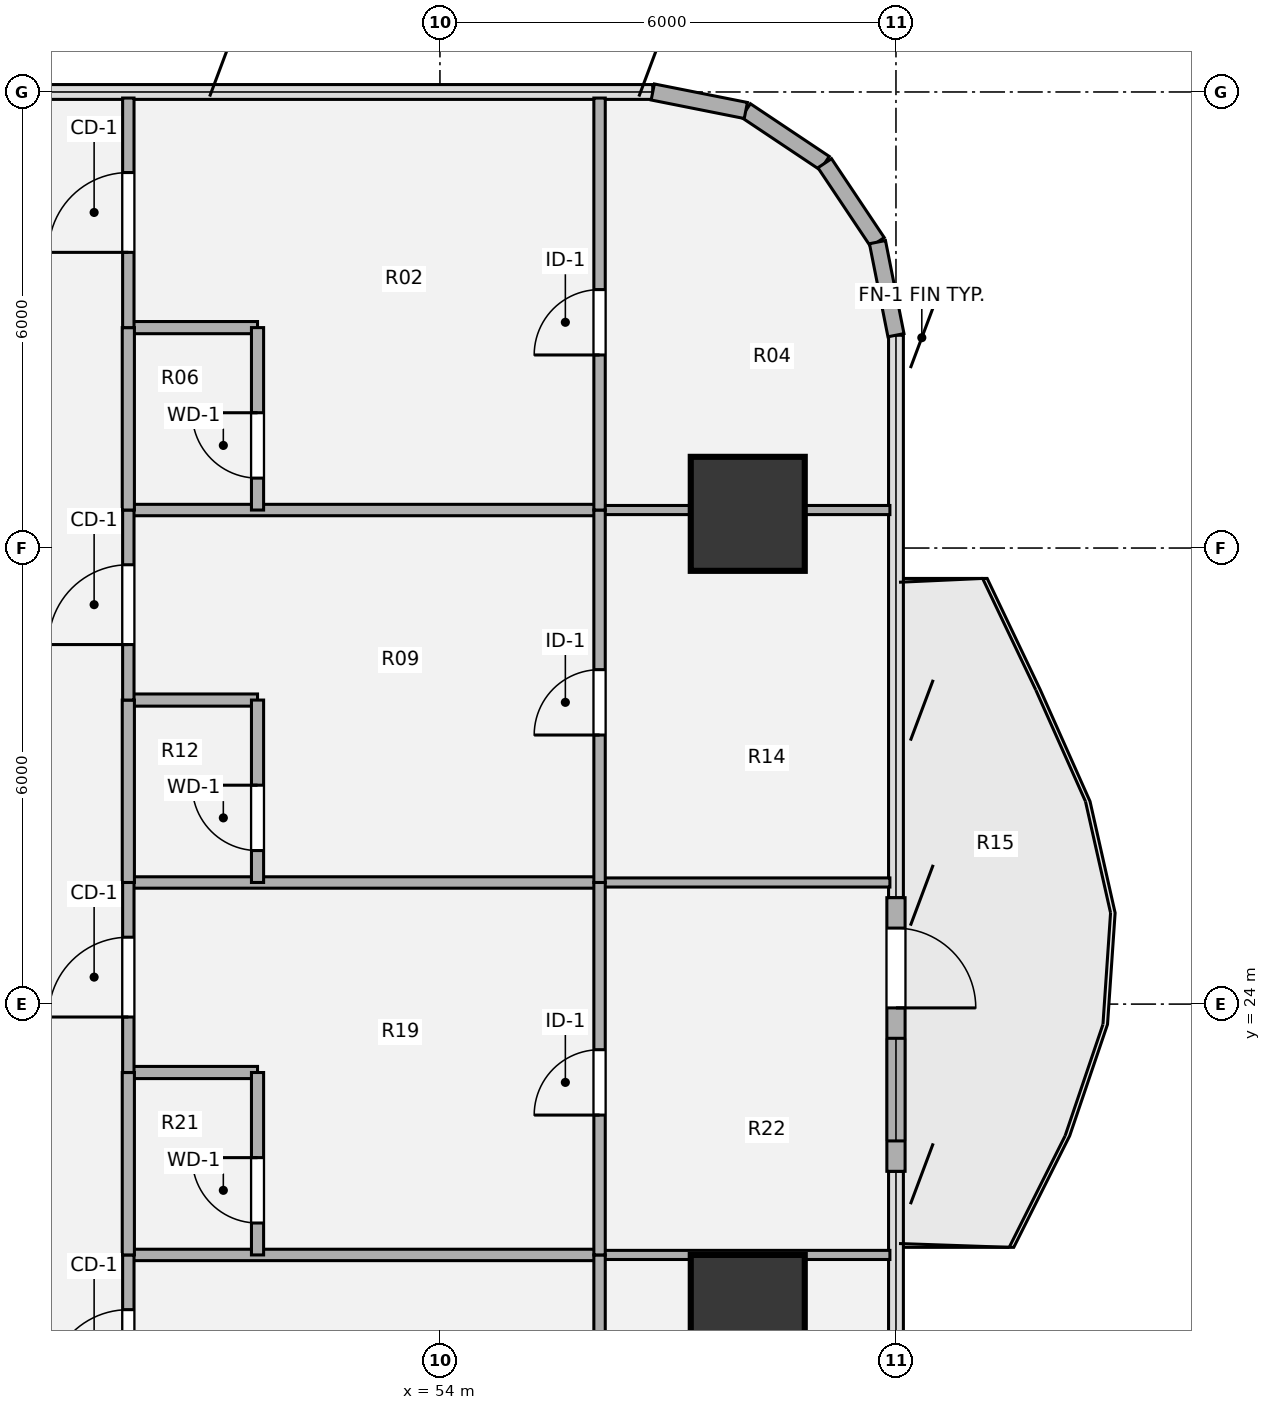
"""IFC4 building model, lengths in metres.
Left out: names, types, materials, properties, quantities, classifications, styles, units other than length and angle.
Written with IfcOpenShell. Run it as: python <this file> out.ifc"""

import sys

from ifc_helpers import new_model, si_unit, direction, frame, frame_2d, origin, origin_2d, place, context, subcontext, project, spatial, rectangle, hollow_circle, extrude, source, transform, mapped, element, fill, save


model = new_model("IFC4")
c1 = context("Model", 3, precision=1e-05, world=origin(), true_north=direction((0.0, 1.0)))
c2 = subcontext(c1, "Body", "Model", "MODEL_VIEW")
j1 = project(units=[si_unit("LENGTHUNIT", "METRE"), si_unit("PLANEANGLEUNIT", "RADIAN")], contexts=[c1])
p1 = place(None, origin())
s1 = spatial("IfcSite", under=j1, at=p1, CompositionType="ELEMENT")
p2 = place(p1, origin())
s2 = spatial("IfcBuilding", under=s1, at=p2, CompositionType="ELEMENT")
p3 = place(p2, frame((0.0, 0.0, 68.58)))
s3 = spatial("IfcBuildingStorey", under=s2, at=p3, CompositionType="ELEMENT", Elevation=68.58)
m1 = source(origin(), c2, "Body", "SweptSolid", [
    extrude(hollow_circle(Radius=0.75, WallThickness=0.05, at=origin_2d()), origin(), (0.0, 0.0, 1.0), 3.78),
])
for number, where, z_axis, x_axis in (
    (1, (58.05, 19.95, 0.0), (0.0, 0.0, 1.0), (1.0, 0.0, 0.0)),
    (2, (58.05, 30.45, 0.0), (0.0, 0.0, 1.0), (1.0, 0.0, 0.0)),
):
    element("IfcColumn", number, at=place(p3, frame(where, z_axis=z_axis, x_axis=x_axis)), inside=s3, PredefinedType="COLUMN", context=c2, shape_type="MappedRepresentation", body=[
        mapped(m1, transform((0.0, 0.0, 0.0), x_axis=(1.0, 0.0, 0.0), y_axis=(0.0, 1.0, 0.0), z_axis=(0.0, 0.0, 1.0), scale=1.0)),
    ])
for number, where, z_axis, x_axis in (
    (3, (58.025, 35.756, 0.0), (0.0, 0.0, 1.0), (0.831, -0.556, 0.0)),
    (4, (59.063, 35.063, 0.0), (0.0, 0.0, 1.0), (0.556, -0.831, 0.0)),
    (5, (59.756, 34.025, 0.0), (0.0, 0.0, 1.0), (0.195, -0.981, 0.0)),
):
    element("IfcWall", number, at=place(p3, frame(where, z_axis=z_axis, x_axis=x_axis)), inside=s3, PredefinedType="SOLIDWALL", context=c2, shape_type="SweptSolid", body=[
        extrude(rectangle(XDim=1.249, YDim=0.215, at=frame_2d((0.624, 0.0))), origin(), (0.0, 0.0, 1.0), 3.53),
    ])
p4 = place(p3, frame((60.0, 25.4, 0.0), z_axis=(0.0, 0.0, 1.0), x_axis=(0.0, -1.0, 0.0)))
e6 = element("IfcWall", 6, at=p4, inside=s3, PredefinedType="SOLIDWALL", context=c2, shape_type="SweptSolid", body=[
    extrude(rectangle(XDim=3.6, YDim=0.24, at=frame_2d((1.8, 0.0))), origin(), (0.0, 0.0, 1.0), 3.53),
])
p5 = place(p4, frame((0.4, 0.0, 0.0)))
e7 = element("IfcOpeningElement", 7, at=p5, cuts=e6, PredefinedType="OPENING", context=c2, shape_type="SweptSolid", body=[
    extrude(rectangle(XDim=1.05, YDim=2.15, at=origin_2d()), frame((0.525, 0.13, 1.075), z_axis=(0.0, -1.0, 0.0), x_axis=(1.0, 0.0, 0.0)), (0.0, 0.0, 1.0), 0.26),
])
p6 = place(p4, frame((1.85, 0.0, 0.85)))
e8 = element("IfcOpeningElement", 8, at=p6, cuts=e6, PredefinedType="OPENING", context=c2, shape_type="SweptSolid", body=[
    extrude(rectangle(XDim=1.35, YDim=1.35, at=origin_2d()), frame((0.675, 0.13, 0.675), z_axis=(0.0, -1.0, 0.0), x_axis=(1.0, 0.0, 0.0)), (0.0, 0.0, 1.0), 0.26),
])
p7 = place(p3, frame((56.8, 36.0, 0.0), z_axis=(0.0, 0.0, 1.0), x_axis=(0.980775717779, -0.195138390419, 0.0)))
e9 = element("IfcWall", 9, at=p7, inside=s3, PredefinedType="SOLIDWALL", context=c2, shape_type="SweptSolid", body=[
    extrude(rectangle(XDim=1.249, YDim=0.215, at=frame_2d((0.624, 0.0))), origin(), (0.0, 0.0, 1.0), 3.53),
])
p8 = place(p3, frame((49.9, 20.7, 0.0), z_axis=(0.0, 0.0, 1.0), x_axis=(1.0, 0.0, 0.0)))
e10 = element("IfcWall", 10, at=p8, inside=s3, PredefinedType="PARTITIONING", context=c2, shape_type="SweptSolid", body=[
    extrude(rectangle(XDim=6.2, YDim=0.15, at=frame_2d((3.1, 0.0))), origin(), (0.0, 0.0, 1.0), 2.982),
])
p9 = place(p3, frame((56.1, 20.7, 0.0), z_axis=(0.0, 0.0, 1.0), x_axis=(1.0, 0.0, 0.0)))
e11 = element("IfcWall", 11, at=p9, inside=s3, PredefinedType="PARTITIONING", context=c2, shape_type="SweptSolid", body=[
    extrude(rectangle(XDim=3.82, YDim=0.12, at=frame_2d((1.91, 0.0))), origin(), (0.0, 0.0, 1.0), 2.982),
])
p10 = place(p3, frame((49.9, 23.1, 0.0), z_axis=(0.0, 0.0, 1.0), x_axis=(1.0, 0.0, 0.0)))
e12 = element("IfcWall", 12, at=p10, inside=s3, PredefinedType="PLUMBINGWALL", context=c2, shape_type="SweptSolid", body=[
    extrude(rectangle(XDim=1.7, YDim=0.16, at=frame_2d((0.85, 0.0))), origin(), (0.0, 0.0, 1.0), 3.055),
])
p11 = place(p3, frame((49.9, 25.6, 0.0), z_axis=(0.0, 0.0, 1.0), x_axis=(1.0, 0.0, 0.0)))
e13 = element("IfcWall", 13, at=p11, inside=s3, PredefinedType="PARTITIONING", context=c2, shape_type="SweptSolid", body=[
    extrude(rectangle(XDim=6.2, YDim=0.15, at=frame_2d((3.1, 0.0))), origin(), (0.0, 0.0, 1.0), 2.982),
])
p12 = place(p3, frame((56.1, 25.6, 0.0), z_axis=(0.0, 0.0, 1.0), x_axis=(1.0, 0.0, 0.0)))
e14 = element("IfcWall", 14, at=p12, inside=s3, PredefinedType="PARTITIONING", context=c2, shape_type="SweptSolid", body=[
    extrude(rectangle(XDim=3.82, YDim=0.12, at=frame_2d((1.91, 0.0))), origin(), (0.0, 0.0, 1.0), 2.982),
])
p13 = place(p3, frame((49.9, 28.0, 0.0), z_axis=(0.0, 0.0, 1.0), x_axis=(1.0, 0.0, 0.0)))
e15 = element("IfcWall", 15, at=p13, inside=s3, PredefinedType="PLUMBINGWALL", context=c2, shape_type="SweptSolid", body=[
    extrude(rectangle(XDim=1.7, YDim=0.16, at=frame_2d((0.85, 0.0))), origin(), (0.0, 0.0, 1.0), 2.982),
])
p14 = place(p3, frame((49.9, 30.5, 0.0), z_axis=(0.0, 0.0, 1.0), x_axis=(1.0, 0.0, 0.0)))
e16 = element("IfcWall", 16, at=p14, inside=s3, PredefinedType="PARTITIONING", context=c2, shape_type="SweptSolid", body=[
    extrude(rectangle(XDim=6.2, YDim=0.15, at=frame_2d((3.1, 0.0))), origin(), (0.0, 0.0, 1.0), 2.903),
])
p15 = place(p3, frame((56.1, 30.5, 0.0), z_axis=(0.0, 0.0, 1.0), x_axis=(1.0, 0.0, 0.0)))
e17 = element("IfcWall", 17, at=p15, inside=s3, PredefinedType="PARTITIONING", context=c2, shape_type="SweptSolid", body=[
    extrude(rectangle(XDim=3.82, YDim=0.12, at=frame_2d((1.91, 0.0))), origin(), (0.0, 0.0, 1.0), 2.903),
])
p16 = place(p3, frame((49.9, 32.9, 0.0), z_axis=(0.0, 0.0, 1.0), x_axis=(1.0, 0.0, 0.0)))
e18 = element("IfcWall", 18, at=p16, inside=s3, PredefinedType="PLUMBINGWALL", context=c2, shape_type="SweptSolid", body=[
    extrude(rectangle(XDim=1.7, YDim=0.16, at=frame_2d((0.85, 0.0))), origin(), (0.0, 0.0, 1.0), 3.055),
])
p17 = place(p3, frame((49.9, 18.2, 0.0), z_axis=(0.0, 0.0, 1.0), x_axis=(0.0, 1.0, 0.0)))
e19 = element("IfcWall", 19, at=p17, inside=s3, PredefinedType="PARTITIONING", context=c2, shape_type="SweptSolid", body=[
    extrude(rectangle(XDim=2.5, YDim=0.15, at=frame_2d((1.25, 0.0))), origin(), (0.0, 0.0, 1.0), 3.5),
])
p18 = place(p17, frame((0.73, 0.0, 0.0)))
e20 = element("IfcOpeningElement", 20, at=p18, cuts=e19, PredefinedType="OPENING", context=c2, shape_type="SweptSolid", body=[
    extrude(rectangle(XDim=1.05, YDim=2.1, at=origin_2d()), frame((0.525, 0.085, 1.05), z_axis=(0.0, -1.0, 0.0), x_axis=(1.0, 0.0, 0.0)), (0.0, 0.0, 1.0), 0.17),
])
p19 = place(p3, frame((49.9, 20.7, 0.0), z_axis=(0.0, 0.0, 1.0), x_axis=(0.0, 1.0, 0.0)))
e21 = element("IfcWall", 21, at=p19, inside=s3, PredefinedType="PLUMBINGWALL", context=c2, shape_type="SweptSolid", body=[
    extrude(rectangle(XDim=2.4, YDim=0.16, at=frame_2d((1.2, 0.0))), origin(), (0.0, 0.0, 1.0), 3.5),
])
p20 = place(p3, frame((49.9, 23.1, 0.0), z_axis=(0.0, 0.0, 1.0), x_axis=(0.0, 1.0, 0.0)))
e22 = element("IfcWall", 22, at=p20, inside=s3, PredefinedType="PARTITIONING", context=c2, shape_type="SweptSolid", body=[
    extrude(rectangle(XDim=2.5, YDim=0.15, at=frame_2d((1.25, 0.0))), origin(), (0.0, 0.0, 1.0), 3.5),
])
p21 = place(p20, frame((0.73, 0.0, 0.0)))
e23 = element("IfcOpeningElement", 23, at=p21, cuts=e22, PredefinedType="OPENING", context=c2, shape_type="SweptSolid", body=[
    extrude(rectangle(XDim=1.05, YDim=2.1, at=origin_2d()), frame((0.525, 0.085, 1.05), z_axis=(0.0, -1.0, 0.0), x_axis=(1.0, 0.0, 0.0)), (0.0, 0.0, 1.0), 0.17),
])
p22 = place(p3, frame((49.9, 25.6, 0.0), z_axis=(0.0, 0.0, 1.0), x_axis=(0.0, 1.0, 0.0)))
e24 = element("IfcWall", 24, at=p22, inside=s3, PredefinedType="PLUMBINGWALL", context=c2, shape_type="SweptSolid", body=[
    extrude(rectangle(XDim=2.4, YDim=0.16, at=frame_2d((1.2, 0.0))), origin(), (0.0, 0.0, 1.0), 3.5),
])
p23 = place(p3, frame((49.9, 28.0, 0.0), z_axis=(0.0, 0.0, 1.0), x_axis=(0.0, 1.0, 0.0)))
e25 = element("IfcWall", 25, at=p23, inside=s3, PredefinedType="PARTITIONING", context=c2, shape_type="SweptSolid", body=[
    extrude(rectangle(XDim=2.5, YDim=0.15, at=frame_2d((1.25, 0.0))), origin(), (0.0, 0.0, 1.0), 3.5),
])
p24 = place(p23, frame((0.73, 0.0, 0.0)))
e26 = element("IfcOpeningElement", 26, at=p24, cuts=e25, PredefinedType="OPENING", context=c2, shape_type="SweptSolid", body=[
    extrude(rectangle(XDim=1.05, YDim=2.1, at=origin_2d()), frame((0.525, 0.085, 1.05), z_axis=(0.0, -1.0, 0.0), x_axis=(1.0, 0.0, 0.0)), (0.0, 0.0, 1.0), 0.17),
])
p25 = place(p3, frame((49.9, 30.5, 0.0), z_axis=(0.0, 0.0, 1.0), x_axis=(0.0, 1.0, 0.0)))
e27 = element("IfcWall", 27, at=p25, inside=s3, PredefinedType="PLUMBINGWALL", context=c2, shape_type="SweptSolid", body=[
    extrude(rectangle(XDim=2.4, YDim=0.16, at=frame_2d((1.2, 0.0))), origin(), (0.0, 0.0, 1.0), 3.5),
])
p26 = place(p3, frame((49.9, 32.9, 0.0), z_axis=(0.0, 0.0, 1.0), x_axis=(0.0, 1.0, 0.0)))
e28 = element("IfcWall", 28, at=p26, inside=s3, PredefinedType="PARTITIONING", context=c2, shape_type="SweptSolid", body=[
    extrude(rectangle(XDim=3.02, YDim=0.15, at=frame_2d((1.51, 0.0))), origin(), (0.0, 0.0, 1.0), 3.5),
])
p27 = place(p26, frame((0.99, 0.0, 0.0)))
e29 = element("IfcOpeningElement", 29, at=p27, cuts=e28, PredefinedType="OPENING", context=c2, shape_type="SweptSolid", body=[
    extrude(rectangle(XDim=1.05, YDim=2.1, at=origin_2d()), frame((0.525, 0.085, 1.05), z_axis=(0.0, -1.0, 0.0), x_axis=(1.0, 0.0, 0.0)), (0.0, 0.0, 1.0), 0.17),
])
p28 = place(p3, frame((51.6, 20.7, 0.0), z_axis=(0.0, 0.0, 1.0), x_axis=(0.0, 1.0, 0.0)))
e30 = element("IfcWall", 30, at=p28, inside=s3, PredefinedType="PLUMBINGWALL", context=c2, shape_type="SweptSolid", body=[
    extrude(rectangle(XDim=2.4, YDim=0.16, at=frame_2d((1.2, 0.0))), origin(), (0.0, 0.0, 1.0), 3.5),
])
p29 = place(p28, frame((0.42, 0.0, 0.0)))
e31 = element("IfcOpeningElement", 31, at=p29, cuts=e30, PredefinedType="OPENING", context=c2, shape_type="SweptSolid", body=[
    extrude(rectangle(XDim=0.86, YDim=2.1, at=origin_2d()), frame((0.43, 0.09, 1.05), z_axis=(0.0, -1.0, 0.0), x_axis=(1.0, 0.0, 0.0)), (0.0, 0.0, 1.0), 0.18),
])
p30 = place(p3, frame((51.6, 25.6, 0.0), z_axis=(0.0, 0.0, 1.0), x_axis=(0.0, 1.0, 0.0)))
e32 = element("IfcWall", 32, at=p30, inside=s3, PredefinedType="PLUMBINGWALL", context=c2, shape_type="SweptSolid", body=[
    extrude(rectangle(XDim=2.4, YDim=0.16, at=frame_2d((1.2, 0.0))), origin(), (0.0, 0.0, 1.0), 3.5),
])
p31 = place(p30, frame((0.42, 0.0, 0.0)))
e33 = element("IfcOpeningElement", 33, at=p31, cuts=e32, PredefinedType="OPENING", context=c2, shape_type="SweptSolid", body=[
    extrude(rectangle(XDim=0.86, YDim=2.1, at=origin_2d()), frame((0.43, 0.09, 1.05), z_axis=(0.0, -1.0, 0.0), x_axis=(1.0, 0.0, 0.0)), (0.0, 0.0, 1.0), 0.18),
])
p32 = place(p3, frame((51.6, 30.5, 0.0), z_axis=(0.0, 0.0, 1.0), x_axis=(0.0, 1.0, 0.0)))
e34 = element("IfcWall", 34, at=p32, inside=s3, PredefinedType="PLUMBINGWALL", context=c2, shape_type="SweptSolid", body=[
    extrude(rectangle(XDim=2.4, YDim=0.16, at=frame_2d((1.2, 0.0))), origin(), (0.0, 0.0, 1.0), 3.5),
])
p33 = place(p32, frame((0.42, 0.0, 0.0)))
e35 = element("IfcOpeningElement", 35, at=p33, cuts=e34, PredefinedType="OPENING", context=c2, shape_type="SweptSolid", body=[
    extrude(rectangle(XDim=0.86, YDim=2.1, at=origin_2d()), frame((0.43, 0.09, 1.05), z_axis=(0.0, -1.0, 0.0), x_axis=(1.0, 0.0, 0.0)), (0.0, 0.0, 1.0), 0.18),
])
p34 = place(p3, frame((56.1, 15.8, 0.0), z_axis=(0.0, 0.0, 1.0), x_axis=(0.0, 1.0, 0.0)))
e36 = element("IfcWall", 36, at=p34, inside=s3, PredefinedType="PARTITIONING", context=c2, shape_type="SweptSolid", body=[
    extrude(rectangle(XDim=4.9, YDim=0.15, at=frame_2d((2.45, 0.0))), origin(), (0.0, 0.0, 1.0), 3.5),
])
p35 = place(p34, frame((1.74, 0.0, 0.0)))
e37 = element("IfcOpeningElement", 37, at=p35, cuts=e36, PredefinedType="OPENING", context=c2, shape_type="SweptSolid", body=[
    extrude(rectangle(XDim=0.86, YDim=2.1, at=origin_2d()), frame((0.43, 0.085, 1.05), z_axis=(0.0, -1.0, 0.0), x_axis=(1.0, 0.0, 0.0)), (0.0, 0.0, 1.0), 0.17),
])
p36 = place(p3, frame((56.1, 20.7, 0.0), z_axis=(0.0, 0.0, 1.0), x_axis=(0.0, 1.0, 0.0)))
e38 = element("IfcWall", 38, at=p36, inside=s3, PredefinedType="PARTITIONING", context=c2, shape_type="SweptSolid", body=[
    extrude(rectangle(XDim=4.9, YDim=0.15, at=frame_2d((2.45, 0.0))), origin(), (0.0, 0.0, 1.0), 3.5),
])
p37 = place(p36, frame((1.84, 0.0, 0.0)))
e39 = element("IfcOpeningElement", 39, at=p37, cuts=e38, PredefinedType="OPENING", context=c2, shape_type="SweptSolid", body=[
    extrude(rectangle(XDim=0.86, YDim=2.1, at=origin_2d()), frame((0.43, 0.085, 1.05), z_axis=(0.0, -1.0, 0.0), x_axis=(1.0, 0.0, 0.0)), (0.0, 0.0, 1.0), 0.17),
])
p38 = place(p3, frame((56.1, 25.6, 0.0), z_axis=(0.0, 0.0, 1.0), x_axis=(0.0, 1.0, 0.0)))
e40 = element("IfcWall", 40, at=p38, inside=s3, PredefinedType="PARTITIONING", context=c2, shape_type="SweptSolid", body=[
    extrude(rectangle(XDim=4.9, YDim=0.15, at=frame_2d((2.45, 0.0))), origin(), (0.0, 0.0, 1.0), 3.5),
])
p39 = place(p38, frame((1.94, 0.0, 0.0)))
e41 = element("IfcOpeningElement", 41, at=p39, cuts=e40, PredefinedType="OPENING", context=c2, shape_type="SweptSolid", body=[
    extrude(rectangle(XDim=0.86, YDim=2.1, at=origin_2d()), frame((0.43, 0.085, 1.05), z_axis=(0.0, -1.0, 0.0), x_axis=(1.0, 0.0, 0.0)), (0.0, 0.0, 1.0), 0.17),
])
p40 = place(p3, frame((56.1, 30.5, 0.0), z_axis=(0.0, 0.0, 1.0), x_axis=(0.0, 1.0, 0.0)))
e42 = element("IfcWall", 42, at=p40, inside=s3, PredefinedType="PARTITIONING", context=c2, shape_type="SweptSolid", body=[
    extrude(rectangle(XDim=5.42, YDim=0.15, at=frame_2d((2.71, 0.0))), origin(), (0.0, 0.0, 1.0), 3.5),
])
p41 = place(p40, frame((2.04, 0.0, 0.0)))
e43 = element("IfcOpeningElement", 43, at=p41, cuts=e42, PredefinedType="OPENING", context=c2, shape_type="SweptSolid", body=[
    extrude(rectangle(XDim=0.86, YDim=2.1, at=origin_2d()), frame((0.43, 0.085, 1.05), z_axis=(0.0, -1.0, 0.0), x_axis=(1.0, 0.0, 0.0)), (0.0, 0.0, 1.0), 0.17),
])
m2 = source(origin(), c2, "Body", "SweptSolid", [
    extrude(rectangle(XDim=1.05, YDim=2.15, at=origin_2d()), frame((0.525, 0.025, 1.075), z_axis=(0.0, -1.0, 0.0), x_axis=(1.0, 0.0, 0.0)), (0.0, 0.0, 1.0), 0.05),
])
p42 = place(p5, origin())
e44 = element("IfcDoor", 44, at=p42, inside=s3, OperationType="SINGLE_SWING_RIGHT", PredefinedType="DOOR", context=c2, shape_type="MappedRepresentation", body=[
    mapped(m2, transform((0.0, 0.0, 0.0), x_axis=(1.0, 0.0, 0.0), y_axis=(0.0, 1.0, 0.0), z_axis=(0.0, 0.0, 1.0), scale=1.0)),
])
fill(e7, e44)
m3 = source(origin(), c2, "Body", "SweptSolid", [
    extrude(rectangle(XDim=1.35, YDim=1.35, at=origin_2d()), frame((0.675, 0.03, 0.675), z_axis=(0.0, -1.0, 0.0), x_axis=(1.0, 0.0, 0.0)), (0.0, 0.0, 1.0), 0.06),
])
p43 = place(p6, origin())
e45 = element("IfcWindow", 45, at=p43, inside=s3, PartitioningType="SINGLE_PANEL", PredefinedType="WINDOW", context=c2, shape_type="MappedRepresentation", body=[
    mapped(m3, transform((0.0, 0.0, 0.0), x_axis=(1.0, 0.0, 0.0), y_axis=(0.0, 1.0, 0.0), z_axis=(0.0, 0.0, 1.0), scale=1.0)),
])
fill(e8, e45)
m4 = source(origin(), c2, "Body", "SweptSolid", [
    extrude(rectangle(XDim=1.05, YDim=2.1, at=origin_2d()), frame((0.525, 0.025, 1.05), z_axis=(0.0, -1.0, 0.0), x_axis=(1.0, 0.0, 0.0)), (0.0, 0.0, 1.0), 0.05),
])
p44 = place(p18, origin())
e46 = element("IfcDoor", 46, at=p44, inside=s3, OperationType="SINGLE_SWING_LEFT", PredefinedType="DOOR", context=c2, shape_type="MappedRepresentation", body=[
    mapped(m4, transform((0.0, 0.0, 0.0), x_axis=(1.0, 0.0, 0.0), y_axis=(0.0, 1.0, 0.0), z_axis=(0.0, 0.0, 1.0), scale=1.0)),
])
fill(e20, e46)
p45 = place(p21, origin())
e47 = element("IfcDoor", 47, at=p45, inside=s3, OperationType="SINGLE_SWING_LEFT", PredefinedType="DOOR", context=c2, shape_type="MappedRepresentation", body=[
    mapped(m4, transform((0.0, 0.0, 0.0), x_axis=(1.0, 0.0, 0.0), y_axis=(0.0, 1.0, 0.0), z_axis=(0.0, 0.0, 1.0), scale=1.0)),
])
fill(e23, e47)
p46 = place(p24, origin())
e48 = element("IfcDoor", 48, at=p46, inside=s3, OperationType="SINGLE_SWING_LEFT", PredefinedType="DOOR", context=c2, shape_type="MappedRepresentation", body=[
    mapped(m4, transform((0.0, 0.0, 0.0), x_axis=(1.0, 0.0, 0.0), y_axis=(0.0, 1.0, 0.0), z_axis=(0.0, 0.0, 1.0), scale=1.0)),
])
fill(e26, e48)
p47 = place(p27, origin())
e49 = element("IfcDoor", 49, at=p47, inside=s3, OperationType="SINGLE_SWING_LEFT", PredefinedType="DOOR", context=c2, shape_type="MappedRepresentation", body=[
    mapped(m4, transform((0.0, 0.0, 0.0), x_axis=(1.0, 0.0, 0.0), y_axis=(0.0, 1.0, 0.0), z_axis=(0.0, 0.0, 1.0), scale=1.0)),
])
fill(e29, e49)
m5 = source(origin(), c2, "Body", "SweptSolid", [
    extrude(rectangle(XDim=0.86, YDim=2.1, at=origin_2d()), frame((0.43, 0.025, 1.05), z_axis=(0.0, -1.0, 0.0), x_axis=(1.0, 0.0, 0.0)), (0.0, 0.0, 1.0), 0.05),
])
p48 = place(p29, origin())
e50 = element("IfcDoor", 50, at=p48, inside=s3, OperationType="SINGLE_SWING_RIGHT", PredefinedType="DOOR", context=c2, shape_type="MappedRepresentation", body=[
    mapped(m5, transform((0.0, 0.0, 0.0), x_axis=(1.0, 0.0, 0.0), y_axis=(0.0, 1.0, 0.0), z_axis=(0.0, 0.0, 1.0), scale=1.0)),
])
fill(e31, e50)
p49 = place(p31, origin())
e51 = element("IfcDoor", 51, at=p49, inside=s3, OperationType="SINGLE_SWING_RIGHT", PredefinedType="DOOR", context=c2, shape_type="MappedRepresentation", body=[
    mapped(m5, transform((0.0, 0.0, 0.0), x_axis=(1.0, 0.0, 0.0), y_axis=(0.0, 1.0, 0.0), z_axis=(0.0, 0.0, 1.0), scale=1.0)),
])
fill(e33, e51)
p50 = place(p33, origin())
e52 = element("IfcDoor", 52, at=p50, inside=s3, OperationType="SINGLE_SWING_RIGHT", PredefinedType="DOOR", context=c2, shape_type="MappedRepresentation", body=[
    mapped(m5, transform((0.0, 0.0, 0.0), x_axis=(1.0, 0.0, 0.0), y_axis=(0.0, 1.0, 0.0), z_axis=(0.0, 0.0, 1.0), scale=1.0)),
])
fill(e35, e52)
m6 = source(origin(), c2, "Body", "SweptSolid", [
    extrude(rectangle(XDim=0.86, YDim=2.1, at=origin_2d()), frame((0.43, 0.025, 1.05), z_axis=(0.0, -1.0, 0.0), x_axis=(1.0, 0.0, 0.0)), (0.0, 0.0, 1.0), 0.05),
])
p51 = place(p37, origin())
e53 = element("IfcDoor", 53, at=p51, inside=s3, OperationType="SINGLE_SWING_LEFT", PredefinedType="DOOR", context=c2, shape_type="MappedRepresentation", body=[
    mapped(m6, transform((0.0, 0.0, 0.0), x_axis=(1.0, 0.0, 0.0), y_axis=(0.0, 1.0, 0.0), z_axis=(0.0, 0.0, 1.0), scale=1.0)),
])
fill(e39, e53)
p52 = place(p39, origin())
e54 = element("IfcDoor", 54, at=p52, inside=s3, OperationType="SINGLE_SWING_LEFT", PredefinedType="DOOR", context=c2, shape_type="MappedRepresentation", body=[
    mapped(m6, transform((0.0, 0.0, 0.0), x_axis=(1.0, 0.0, 0.0), y_axis=(0.0, 1.0, 0.0), z_axis=(0.0, 0.0, 1.0), scale=1.0)),
])
fill(e41, e54)
p53 = place(p41, origin())
e55 = element("IfcDoor", 55, at=p53, inside=s3, OperationType="SINGLE_SWING_LEFT", PredefinedType="DOOR", context=c2, shape_type="MappedRepresentation", body=[
    mapped(m6, transform((0.0, 0.0, 0.0), x_axis=(1.0, 0.0, 0.0), y_axis=(0.0, 1.0, 0.0), z_axis=(0.0, 0.0, 1.0), scale=1.0)),
])
fill(e43, e55)
save(model, sys.argv[1])
